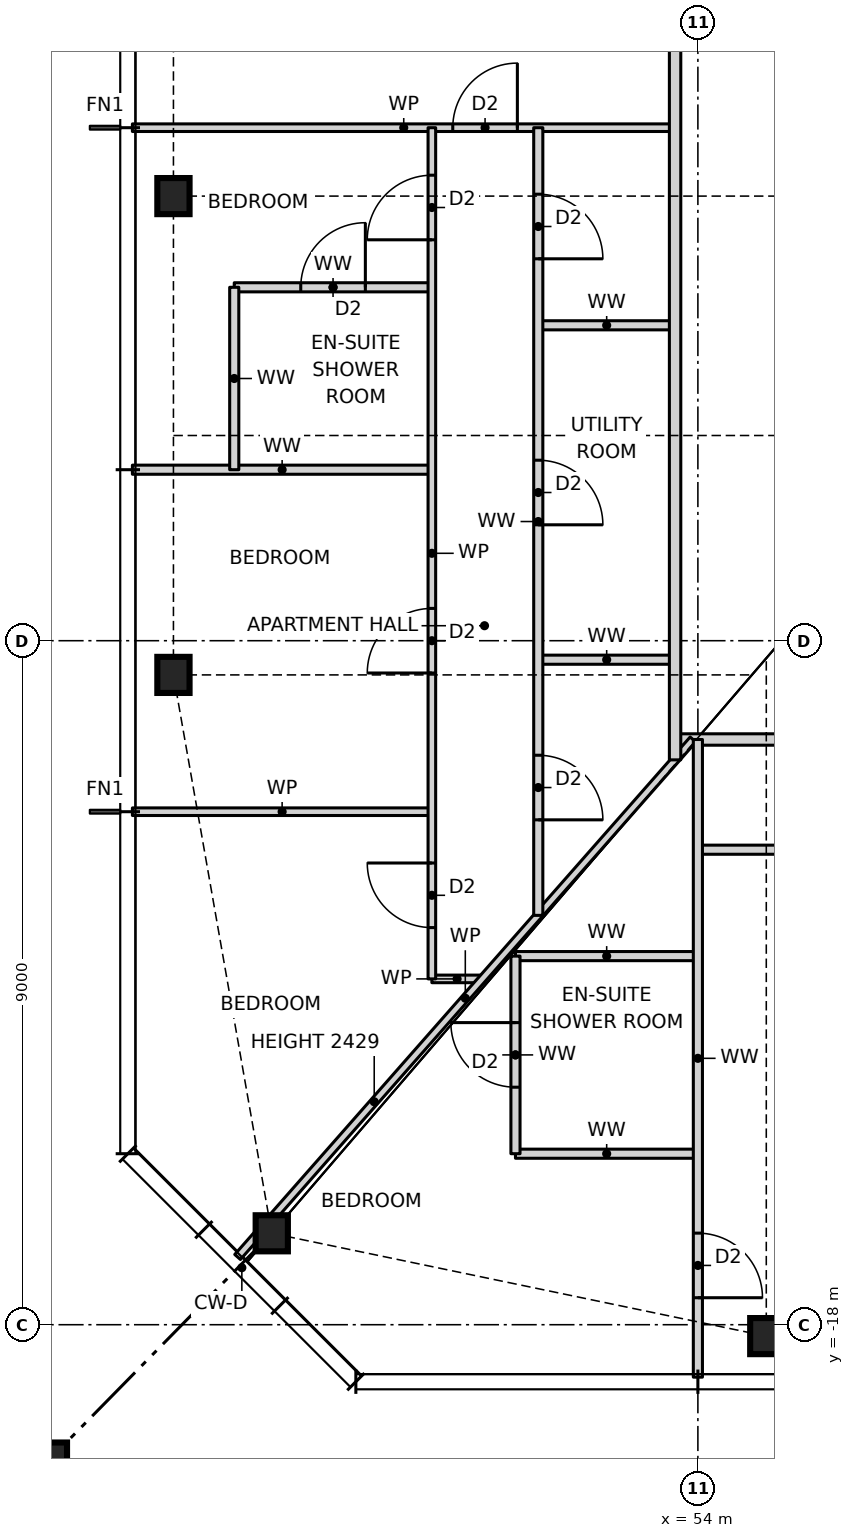
"""IFC4 building model, lengths in metres.
Left out: names, types, materials, properties, quantities, classifications, styles, units other than length and angle.
Written with IfcOpenShell. Run it as: python <this file> out.ifc"""

import sys

from ifc_helpers import new_model, si_unit, direction, frame, frame_2d, origin, origin_2d, place, context, subcontext, project, spatial, rectangle, hollow_rectangle, i_section, extrude, element, fill, save


model = new_model("IFC4")
c1 = context("Model", 3, precision=1e-05, world=origin(), true_north=direction((0.0, 1.0)))
c2 = subcontext(c1, "Body", "Model", "MODEL_VIEW")
j1 = project(units=[si_unit("LENGTHUNIT", "METRE"), si_unit("PLANEANGLEUNIT", "RADIAN")], contexts=[c1])
p1 = place(None, origin())
s1 = spatial("IfcSite", under=j1, at=p1, CompositionType="ELEMENT")
p2 = place(p1, origin())
s2 = spatial("IfcBuilding", under=s1, at=p2, CompositionType="ELEMENT")
p3 = place(p2, frame((0.0, 0.0, 46.5)))
s3 = spatial("IfcBuildingStorey", under=s2, at=p3, CompositionType="ELEMENT", Elevation=46.5)
for number, where, z_axis, x_axis in (
    (1, (48.394, -16.797, 0.0), (0.0, 0.0, 1.0), (1.0, 0.0, 0.0)),
    (2, (54.9, -18.15, 0.0), (0.0, 0.0, 1.0), (1.0, 0.0, 0.0)),
    (3, (47.1, -3.15, 0.0), (0.0, 0.0, 1.0), (1.0, 0.0, 0.0)),
    (4, (47.1, -9.45, 0.0), (0.0, 0.0, 1.0), (1.0, 0.0, 0.0)),
):
    element("IfcColumn", number, at=place(p3, frame(where, z_axis=z_axis, x_axis=x_axis)), inside=s3, PredefinedType="COLUMN", context=c2, shape_type="SweptSolid", body=[
        extrude(i_section(OverallWidth=0.424, OverallDepth=0.475, WebThickness=0.048, FlangeThickness=0.077, at=origin_2d()), origin(), (0.0, 0.0, 1.0), 3.5),
    ])
p4 = place(p3, frame((45.1, -20.15, 0.0), z_axis=(0.0, 0.0, 1.0), x_axis=(1.0, 0.0, 0.0)))
e5 = element("IfcColumn", 5, at=p4, inside=s3, PredefinedType="COLUMN", context=c2, shape_type="SweptSolid", body=[
    extrude(hollow_rectangle(XDim=1.2, YDim=1.2, WallThickness=0.07, at=origin_2d()), origin(), (0.0, 0.0, 1.0), 3.5),
])
p5 = place(p3, frame((51.6, -15.75, 0.0), z_axis=(0.0, 0.0, 1.0), x_axis=(1.0, 0.0, 0.0)))
e6 = element("IfcWall", 6, at=p5, inside=s3, PredefinedType="PARTITIONING", context=c2, shape_type="SweptSolid", body=[
    extrude(rectangle(XDim=2.4, YDim=0.12, at=frame_2d((1.2, 0.0))), origin(), (0.0, 0.0, 1.0), 3.27),
])
p6 = place(p3, frame((50.5, -13.45, 0.0), z_axis=(0.0, 0.0, 1.0), x_axis=(1.0, 0.0, 0.0)))
e7 = element("IfcWall", 7, at=p6, inside=s3, PredefinedType="PARTITIONING", context=c2, shape_type="SweptSolid", body=[
    extrude(rectangle(XDim=0.664, YDim=0.1, at=frame_2d((0.332, 0.0))), origin(), (0.0, 0.0, 1.0), 3.27),
])
p7 = place(p3, frame((51.6, -13.15, 0.0), z_axis=(0.0, 0.0, 1.0), x_axis=(1.0, 0.0, 0.0)))
e8 = element("IfcWall", 8, at=p7, inside=s3, PredefinedType="PARTITIONING", context=c2, shape_type="SweptSolid", body=[
    extrude(rectangle(XDim=2.4, YDim=0.12, at=frame_2d((1.2, 0.0))), origin(), (0.0, 0.0, 1.0), 3.27),
])
p8 = place(p3, frame((54.0, -11.75, 0.0), z_axis=(0.0, 0.0, 1.0), x_axis=(1.0, 0.0, 0.0)))
e9 = element("IfcWall", 9, at=p8, inside=s3, PredefinedType="PARTITIONING", context=c2, shape_type="SweptSolid", body=[
    extrude(rectangle(XDim=19.34, YDim=0.12, at=frame_2d((9.67, 0.0))), origin(), (0.0, 0.0, 1.0), 3.27),
])
p9 = place(p8, frame((1.375, 0.0, 0.0)))
e10 = element("IfcOpeningElement", 10, at=p9, cuts=e9, PredefinedType="OPENING", context=c2, shape_type="SweptSolid", body=[
    extrude(rectangle(XDim=0.85, YDim=2.1, at=frame_2d((0.425, 1.05))), frame((0.0, 0.07, 0.0), z_axis=(0.0, -1.0, 0.0), x_axis=(1.0, 0.0, 0.0)), (0.0, 0.0, 1.0), 0.14),
])
p10 = place(p8, frame((4.575, 0.0, 0.0)))
e11 = element("IfcOpeningElement", 11, at=p10, cuts=e9, PredefinedType="OPENING", context=c2, shape_type="SweptSolid", body=[
    extrude(rectangle(XDim=0.85, YDim=2.1, at=frame_2d((0.425, 1.05))), frame((0.0, 0.07, 0.0), z_axis=(0.0, -1.0, 0.0), x_axis=(1.0, 0.0, 0.0)), (0.0, 0.0, 1.0), 0.14),
])
p11 = place(p8, frame((11.325, 0.0, 0.0)))
e12 = element("IfcOpeningElement", 12, at=p11, cuts=e9, PredefinedType="OPENING", context=c2, shape_type="SweptSolid", body=[
    extrude(rectangle(XDim=0.85, YDim=2.1, at=frame_2d((0.425, 1.05))), frame((0.0, 0.07, 0.0), z_axis=(0.0, -1.0, 0.0), x_axis=(1.0, 0.0, 0.0)), (0.0, 0.0, 1.0), 0.14),
])
p12 = place(p8, frame((16.495, 0.0, 0.0)))
e13 = element("IfcOpeningElement", 13, at=p12, cuts=e9, PredefinedType="OPENING", context=c2, shape_type="SweptSolid", body=[
    extrude(rectangle(XDim=0.85, YDim=2.1, at=frame_2d((0.425, 1.05))), frame((0.0, 0.07, 0.0), z_axis=(0.0, -1.0, 0.0), x_axis=(1.0, 0.0, 0.0)), (0.0, 0.0, 1.0), 0.14),
])
p13 = place(p3, frame((46.56, -11.25, 0.0), z_axis=(0.0, 0.0, 1.0), x_axis=(1.0, 0.0, 0.0)))
e14 = element("IfcWall", 14, at=p13, inside=s3, PredefinedType="PARTITIONING", context=c2, shape_type="SweptSolid", body=[
    extrude(rectangle(XDim=3.94, YDim=0.1, at=frame_2d((1.97, 0.0))), origin(), (0.0, 0.0, 1.0), 3.27),
])
p14 = place(p3, frame((53.7, -10.3, 0.0), z_axis=(0.0, 0.0, 1.0), x_axis=(1.0, 0.0, 0.0)))
e15 = element("IfcWall", 15, at=p14, inside=s3, PredefinedType="PARTITIONING", context=c2, shape_type="SweptSolid", body=[
    extrude(rectangle(XDim=18.6, YDim=0.15, at=frame_2d((9.3, 0.0))), origin(), (0.0, 0.0, 1.0), 3.27),
])
p15 = place(p14, frame((4.8, 0.0, 0.0)))
e16 = element("IfcOpeningElement", 16, at=p15, cuts=e15, PredefinedType="OPENING", context=c2, shape_type="SweptSolid", body=[
    extrude(rectangle(XDim=1.0, YDim=2.1, at=frame_2d((0.5, 1.05))), frame((0.0, 0.085, 0.0), z_axis=(0.0, -1.0, 0.0), x_axis=(1.0, 0.0, 0.0)), (0.0, 0.0, 1.0), 0.17),
])
p16 = place(p3, frame((51.9, -9.25, 0.0), z_axis=(0.0, 0.0, 1.0), x_axis=(1.0, 0.0, 0.0)))
e17 = element("IfcWall", 17, at=p16, inside=s3, PredefinedType="PARTITIONING", context=c2, shape_type="SweptSolid", body=[
    extrude(rectangle(XDim=1.8, YDim=0.12, at=frame_2d((0.9, 0.0))), origin(), (0.0, 0.0, 1.0), 3.27),
])
p17 = place(p3, frame((46.56, -6.75, 0.0), z_axis=(0.0, 0.0, 1.0), x_axis=(1.0, 0.0, 0.0)))
e18 = element("IfcWall", 18, at=p17, inside=s3, PredefinedType="PARTITIONING", context=c2, shape_type="SweptSolid", body=[
    extrude(rectangle(XDim=3.94, YDim=0.12, at=frame_2d((1.97, 0.0))), origin(), (0.0, 0.0, 1.0), 3.27),
])
p18 = place(p3, frame((51.9, -4.85, 0.0), z_axis=(0.0, 0.0, 1.0), x_axis=(1.0, 0.0, 0.0)))
e19 = element("IfcWall", 19, at=p18, inside=s3, PredefinedType="PARTITIONING", context=c2, shape_type="SweptSolid", body=[
    extrude(rectangle(XDim=1.8, YDim=0.12, at=frame_2d((0.9, 0.0))), origin(), (0.0, 0.0, 1.0), 3.27),
])
p19 = place(p3, frame((47.9, -4.35, 0.0), z_axis=(0.0, 0.0, 1.0), x_axis=(1.0, 0.0, 0.0)))
e20 = element("IfcWall", 20, at=p19, inside=s3, PredefinedType="PARTITIONING", context=c2, shape_type="SweptSolid", body=[
    extrude(rectangle(XDim=2.6, YDim=0.12, at=frame_2d((1.3, 0.0))), origin(), (0.0, 0.0, 1.0), 3.27),
])
p20 = place(p19, frame((0.875, 0.0, 0.0)))
e21 = element("IfcOpeningElement", 21, at=p20, cuts=e20, PredefinedType="OPENING", context=c2, shape_type="SweptSolid", body=[
    extrude(rectangle(XDim=0.85, YDim=2.1, at=frame_2d((0.425, 1.05))), frame((0.0, 0.07, 0.0), z_axis=(0.0, -1.0, 0.0), x_axis=(1.0, 0.0, 0.0)), (0.0, 0.0, 1.0), 0.14),
])
p21 = place(p3, frame((46.56, -2.25, 0.0), z_axis=(0.0, 0.0, 1.0), x_axis=(1.0, 0.0, 0.0)))
e22 = element("IfcWall", 22, at=p21, inside=s3, PredefinedType="PARTITIONING", context=c2, shape_type="SweptSolid", body=[
    extrude(rectangle(XDim=7.14, YDim=0.1, at=frame_2d((3.57, 0.0))), origin(), (0.0, 0.0, 1.0), 3.27),
])
p22 = place(p21, frame((4.215, 0.0, 0.0)))
e23 = element("IfcOpeningElement", 23, at=p22, cuts=e22, PredefinedType="OPENING", context=c2, shape_type="SweptSolid", body=[
    extrude(rectangle(XDim=0.85, YDim=2.1, at=frame_2d((0.425, 1.05))), frame((0.0, 0.06, 0.0), z_axis=(0.0, -1.0, 0.0), x_axis=(1.0, 0.0, 0.0)), (0.0, 0.0, 1.0), 0.12),
])
p23 = place(p3, frame((47.944, -17.109, 0.0), z_axis=(0.0, 0.0, 1.0), x_axis=(0.660638210404, 0.750704439146, 0.0)))
e24 = element("IfcWall", 24, at=p23, inside=s3, PredefinedType="PARTITIONING", context=c2, shape_type="SweptSolid", body=[
    extrude(rectangle(XDim=9.07, YDim=0.1, at=frame_2d((4.535, 0.0))), origin(), (0.0, 0.0, 1.0), 2.429),
])
p24 = place(p3, frame((54.0, -18.69, 0.0), z_axis=(0.0, 0.0, 1.0), x_axis=(0.0, 1.0, 0.0)))
e25 = element("IfcWall", 25, at=p24, inside=s3, PredefinedType="PARTITIONING", context=c2, shape_type="SweptSolid", body=[
    extrude(rectangle(XDim=8.39, YDim=0.12, at=frame_2d((4.195, 0.0))), origin(), (0.0, 0.0, 1.0), 3.27),
])
p25 = place(p24, frame((1.045, 0.0, 0.0)))
e26 = element("IfcOpeningElement", 26, at=p25, cuts=e25, PredefinedType="OPENING", context=c2, shape_type="SweptSolid", body=[
    extrude(rectangle(XDim=0.85, YDim=2.1, at=frame_2d((0.425, 1.05))), frame((0.0, 0.07, 0.0), z_axis=(0.0, -1.0, 0.0), x_axis=(1.0, 0.0, 0.0)), (0.0, 0.0, 1.0), 0.14),
])
p26 = place(p3, frame((53.7, -10.568, 0.0), z_axis=(0.0, 0.0, 1.0), x_axis=(0.0, 1.0, 0.0)))
e27 = element("IfcWall", 27, at=p26, inside=s3, PredefinedType="PARTITIONING", context=c2, shape_type="SweptSolid", body=[
    extrude(rectangle(XDim=21.136, YDim=0.15, at=frame_2d((10.568, 0.0))), origin(), (0.0, 0.0, 1.0), 3.27),
])
p27 = place(p26, frame((16.318, 0.0, 0.0)))
e28 = element("IfcOpeningElement", 28, at=p27, cuts=e27, PredefinedType="OPENING", context=c2, shape_type="SweptSolid", body=[
    extrude(rectangle(XDim=1.0, YDim=2.1, at=frame_2d((0.5, 1.05))), frame((0.0, 0.085, 0.0), z_axis=(0.0, -1.0, 0.0), x_axis=(1.0, 0.0, 0.0)), (0.0, 0.0, 1.0), 0.17),
])
p28 = place(p26, frame((10.918, 0.0, 0.0)))
e29 = element("IfcOpeningElement", 29, at=p28, cuts=e27, PredefinedType="OPENING", context=c2, shape_type="SweptSolid", body=[
    extrude(rectangle(XDim=1.0, YDim=2.1, at=frame_2d((0.5, 1.05))), frame((0.0, 0.085, 0.0), z_axis=(0.0, -1.0, 0.0), x_axis=(1.0, 0.0, 0.0)), (0.0, 0.0, 1.0), 0.17),
])
p29 = place(p3, frame((51.9, -12.614, 0.0), z_axis=(0.0, 0.0, 1.0), x_axis=(0.0, 1.0, 0.0)))
e30 = element("IfcWall", 30, at=p29, inside=s3, PredefinedType="PARTITIONING", context=c2, shape_type="SweptSolid", body=[
    extrude(rectangle(XDim=10.364, YDim=0.12, at=frame_2d((5.182, 0.0))), origin(), (0.0, 0.0, 1.0), 3.27),
])
p30 = place(p29, frame((8.639, 0.0, 0.0)))
e31 = element("IfcOpeningElement", 31, at=p30, cuts=e30, PredefinedType="OPENING", context=c2, shape_type="SweptSolid", body=[
    extrude(rectangle(XDim=0.85, YDim=2.1, at=frame_2d((0.425, 1.05))), frame((0.0, 0.07, 0.0), z_axis=(0.0, -1.0, 0.0), x_axis=(1.0, 0.0, 0.0)), (0.0, 0.0, 1.0), 0.14),
])
p31 = place(p29, frame((5.139, 0.0, 0.0)))
e32 = element("IfcOpeningElement", 32, at=p31, cuts=e30, PredefinedType="OPENING", context=c2, shape_type="SweptSolid", body=[
    extrude(rectangle(XDim=0.85, YDim=2.1, at=frame_2d((0.425, 1.05))), frame((0.0, 0.07, 0.0), z_axis=(0.0, -1.0, 0.0), x_axis=(1.0, 0.0, 0.0)), (0.0, 0.0, 1.0), 0.14),
])
p32 = place(p29, frame((1.257, 0.0, 0.0)))
e33 = element("IfcOpeningElement", 33, at=p32, cuts=e30, PredefinedType="OPENING", context=c2, shape_type="SweptSolid", body=[
    extrude(rectangle(XDim=0.85, YDim=2.1, at=frame_2d((0.425, 1.05))), frame((0.0, 0.07, 0.0), z_axis=(0.0, -1.0, 0.0), x_axis=(1.0, 0.0, 0.0)), (0.0, 0.0, 1.0), 0.14),
])
p33 = place(p3, frame((51.6, -15.75, 0.0), z_axis=(0.0, 0.0, 1.0), x_axis=(0.0, 1.0, 0.0)))
e34 = element("IfcWall", 34, at=p33, inside=s3, PredefinedType="PARTITIONING", context=c2, shape_type="SweptSolid", body=[
    extrude(rectangle(XDim=2.6, YDim=0.12, at=frame_2d((1.3, 0.0))), origin(), (0.0, 0.0, 1.0), 3.27),
])
p34 = place(p33, frame((0.875, 0.0, 0.0)))
e35 = element("IfcOpeningElement", 35, at=p34, cuts=e34, PredefinedType="OPENING", context=c2, shape_type="SweptSolid", body=[
    extrude(rectangle(XDim=0.85, YDim=2.1, at=frame_2d((0.425, 1.05))), frame((0.0, 0.07, 0.0), z_axis=(0.0, -1.0, 0.0), x_axis=(1.0, 0.0, 0.0)), (0.0, 0.0, 1.0), 0.14),
])
p35 = place(p3, frame((50.5, -13.45, 0.0), z_axis=(0.0, 0.0, 1.0), x_axis=(0.0, 1.0, 0.0)))
e36 = element("IfcWall", 36, at=p35, inside=s3, PredefinedType="PARTITIONING", context=c2, shape_type="SweptSolid", body=[
    extrude(rectangle(XDim=11.2, YDim=0.1, at=frame_2d((5.6, 0.0))), origin(), (0.0, 0.0, 1.0), 3.27),
])
p36 = place(p35, frame((9.725, 0.0, 0.0)))
e37 = element("IfcOpeningElement", 37, at=p36, cuts=e36, PredefinedType="OPENING", context=c2, shape_type="SweptSolid", body=[
    extrude(rectangle(XDim=0.85, YDim=2.1, at=frame_2d((0.425, 1.05))), frame((0.0, 0.06, 0.0), z_axis=(0.0, -1.0, 0.0), x_axis=(1.0, 0.0, 0.0)), (0.0, 0.0, 1.0), 0.12),
])
p37 = place(p35, frame((4.025, 0.0, 0.0)))
e38 = element("IfcOpeningElement", 38, at=p37, cuts=e36, PredefinedType="OPENING", context=c2, shape_type="SweptSolid", body=[
    extrude(rectangle(XDim=0.85, YDim=2.1, at=frame_2d((0.425, 1.05))), frame((0.0, 0.06, 0.0), z_axis=(0.0, -1.0, 0.0), x_axis=(1.0, 0.0, 0.0)), (0.0, 0.0, 1.0), 0.12),
])
p38 = place(p35, frame((0.675, 0.0, 0.0)))
e39 = element("IfcOpeningElement", 39, at=p38, cuts=e36, PredefinedType="OPENING", context=c2, shape_type="SweptSolid", body=[
    extrude(rectangle(XDim=0.85, YDim=2.1, at=frame_2d((0.425, 1.05))), frame((0.0, 0.06, 0.0), z_axis=(0.0, -1.0, 0.0), x_axis=(1.0, 0.0, 0.0)), (0.0, 0.0, 1.0), 0.12),
])
p39 = place(p3, frame((47.9, -6.75, 0.0), z_axis=(0.0, 0.0, 1.0), x_axis=(0.0, 1.0, 0.0)))
e40 = element("IfcWall", 40, at=p39, inside=s3, PredefinedType="PARTITIONING", context=c2, shape_type="SweptSolid", body=[
    extrude(rectangle(XDim=2.4, YDim=0.12, at=frame_2d((1.2, 0.0))), origin(), (0.0, 0.0, 1.0), 3.27),
])
p40 = place(p34, origin())
e41 = element("IfcDoor", 41, at=p40, inside=s3, OperationType="SINGLE_SWING_RIGHT", PredefinedType="DOOR", context=c2, shape_type="SweptSolid", body=[
    extrude(rectangle(XDim=0.85, YDim=2.1, at=frame_2d((0.425, 1.05))), frame((0.0, 0.025, 0.0), z_axis=(0.0, -1.0, 0.0), x_axis=(1.0, 0.0, 0.0)), (0.0, 0.0, 1.0), 0.05),
])
fill(e35, e41)
p41 = place(p25, frame((0.85, 0.0, 0.0), z_axis=(0.0, 0.0, 1.0), x_axis=(-1.0, 0.0, 0.0)))
e42 = element("IfcDoor", 42, at=p41, inside=s3, OperationType="SINGLE_SWING_RIGHT", PredefinedType="DOOR", context=c2, shape_type="SweptSolid", body=[
    extrude(rectangle(XDim=0.85, YDim=2.1, at=frame_2d((0.425, 1.05))), frame((0.0, 0.025, 0.0), z_axis=(0.0, -1.0, 0.0), x_axis=(1.0, 0.0, 0.0)), (0.0, 0.0, 1.0), 0.05),
])
fill(e26, e42)
p42 = place(p22, origin())
e43 = element("IfcDoor", 43, at=p42, inside=s3, OperationType="SINGLE_SWING_RIGHT", PredefinedType="DOOR", context=c2, shape_type="SweptSolid", body=[
    extrude(rectangle(XDim=0.85, YDim=2.1, at=frame_2d((0.425, 1.05))), frame((0.0, 0.025, 0.0), z_axis=(0.0, -1.0, 0.0), x_axis=(1.0, 0.0, 0.0)), (0.0, 0.0, 1.0), 0.05),
])
fill(e23, e43)
p43 = place(p20, origin())
e44 = element("IfcDoor", 44, at=p43, inside=s3, OperationType="SINGLE_SWING_RIGHT", PredefinedType="DOOR", context=c2, shape_type="SweptSolid", body=[
    extrude(rectangle(XDim=0.85, YDim=2.1, at=frame_2d((0.425, 1.05))), frame((0.0, 0.025, 0.0), z_axis=(0.0, -1.0, 0.0), x_axis=(1.0, 0.0, 0.0)), (0.0, 0.0, 1.0), 0.05),
])
fill(e21, e44)
p44 = place(p36, origin())
e45 = element("IfcDoor", 45, at=p44, inside=s3, OperationType="SINGLE_SWING_LEFT", PredefinedType="DOOR", context=c2, shape_type="SweptSolid", body=[
    extrude(rectangle(XDim=0.85, YDim=2.1, at=frame_2d((0.425, 1.05))), frame((0.0, 0.025, 0.0), z_axis=(0.0, -1.0, 0.0), x_axis=(1.0, 0.0, 0.0)), (0.0, 0.0, 1.0), 0.05),
])
fill(e37, e45)
p45 = place(p37, origin())
e46 = element("IfcDoor", 46, at=p45, inside=s3, OperationType="SINGLE_SWING_LEFT", PredefinedType="DOOR", context=c2, shape_type="SweptSolid", body=[
    extrude(rectangle(XDim=0.85, YDim=2.1, at=frame_2d((0.425, 1.05))), frame((0.0, 0.025, 0.0), z_axis=(0.0, -1.0, 0.0), x_axis=(1.0, 0.0, 0.0)), (0.0, 0.0, 1.0), 0.05),
])
fill(e38, e46)
p46 = place(p38, origin())
e47 = element("IfcDoor", 47, at=p46, inside=s3, OperationType="SINGLE_SWING_RIGHT", PredefinedType="DOOR", context=c2, shape_type="SweptSolid", body=[
    extrude(rectangle(XDim=0.85, YDim=2.1, at=frame_2d((0.425, 1.05))), frame((0.0, 0.025, 0.0), z_axis=(0.0, -1.0, 0.0), x_axis=(1.0, 0.0, 0.0)), (0.0, 0.0, 1.0), 0.05),
])
fill(e39, e47)
p47 = place(p30, frame((0.85, 0.0, 0.0), z_axis=(0.0, 0.0, 1.0), x_axis=(-1.0, 0.0, 0.0)))
e48 = element("IfcDoor", 48, at=p47, inside=s3, OperationType="SINGLE_SWING_RIGHT", PredefinedType="DOOR", context=c2, shape_type="SweptSolid", body=[
    extrude(rectangle(XDim=0.85, YDim=2.1, at=frame_2d((0.425, 1.05))), frame((0.0, 0.025, 0.0), z_axis=(0.0, -1.0, 0.0), x_axis=(1.0, 0.0, 0.0)), (0.0, 0.0, 1.0), 0.05),
])
fill(e31, e48)
p48 = place(p31, frame((0.85, 0.0, 0.0), z_axis=(0.0, 0.0, 1.0), x_axis=(-1.0, 0.0, 0.0)))
e49 = element("IfcDoor", 49, at=p48, inside=s3, OperationType="SINGLE_SWING_RIGHT", PredefinedType="DOOR", context=c2, shape_type="SweptSolid", body=[
    extrude(rectangle(XDim=0.85, YDim=2.1, at=frame_2d((0.425, 1.05))), frame((0.0, 0.025, 0.0), z_axis=(0.0, -1.0, 0.0), x_axis=(1.0, 0.0, 0.0)), (0.0, 0.0, 1.0), 0.05),
])
fill(e32, e49)
p49 = place(p32, frame((0.85, 0.0, 0.0), z_axis=(0.0, 0.0, 1.0), x_axis=(-1.0, 0.0, 0.0)))
e50 = element("IfcDoor", 50, at=p49, inside=s3, OperationType="SINGLE_SWING_RIGHT", PredefinedType="DOOR", context=c2, shape_type="SweptSolid", body=[
    extrude(rectangle(XDim=0.85, YDim=2.1, at=frame_2d((0.425, 1.05))), frame((0.0, 0.025, 0.0), z_axis=(0.0, -1.0, 0.0), x_axis=(1.0, 0.0, 0.0)), (0.0, 0.0, 1.0), 0.05),
])
fill(e33, e50)
save(model, sys.argv[1])
